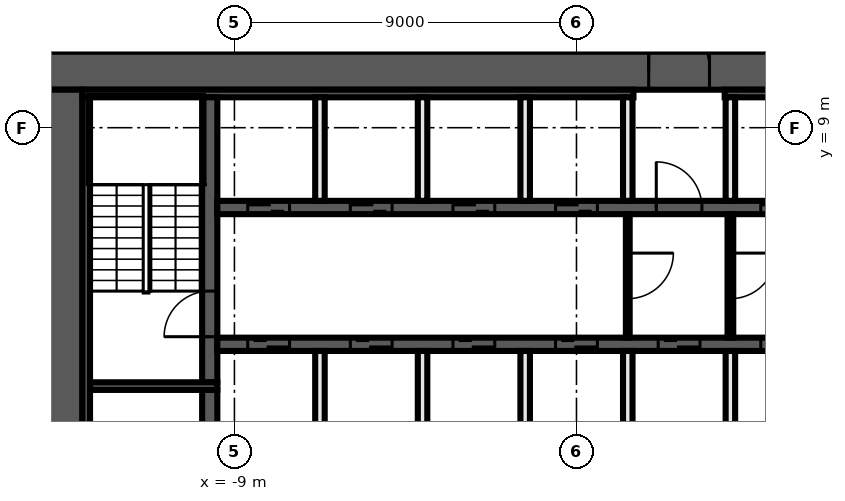
"""IFC4 building model, lengths in metres.
Left out: names, types, materials, properties, quantities, classifications, styles, units other than length and angle.
Written with IfcOpenShell. Run it as: python <this file> out.ifc"""

import sys

from ifc_helpers import new_model, si_unit, direction, frame, frame_2d, origin, place, context, subcontext, project, spatial, rectangle, extrude, element, fill, save


model = new_model("IFC4")
c1 = context("Model", 3, precision=1e-05, world=origin(), true_north=direction((0.0, 1.0)))
c2 = subcontext(c1, "Body", "Model", "MODEL_VIEW")
j1 = project(units=[si_unit("LENGTHUNIT", "METRE"), si_unit("PLANEANGLEUNIT", "RADIAN")], contexts=[c1])
p1 = place(None, origin())
s1 = spatial("IfcSite", under=j1, at=p1, CompositionType="ELEMENT")
p2 = place(p1, origin())
s2 = spatial("IfcBuilding", under=s1, at=p2, CompositionType="ELEMENT")
p3 = place(p2, frame((0.0, 0.0, 128.5)))
s3 = spatial("IfcBuildingStorey", under=s2, at=p3, CompositionType="ELEMENT", Elevation=128.5)
for number, where, z_axis, x_axis in (
    (1, (3.6, 11.0, 0.0), (0.0, 0.0, 1.0), (0.0, 1.0, 0.0)),
    (2, (1.8, 11.0, 0.0), (0.0, 0.0, 1.0), (0.0, 1.0, 0.0)),
):
    element("IfcWall", number, at=place(p3, frame(where, z_axis=z_axis, x_axis=x_axis)), inside=s3, PredefinedType="PARTITIONING", context=c2, shape_type="SweptSolid", body=[
        extrude(rectangle(XDim=0.925, YDim=0.15, at=frame_2d((0.462, 0.0))), origin(), (0.0, 0.0, 1.0), 3.3),
    ])
p4 = place(p3, frame((-14.0, 10.5, 0.0), z_axis=(0.0, 0.0, 1.0), x_axis=(1.0, 0.0, 0.0)))
e3 = element("IfcWall", 3, at=p4, inside=s3, PredefinedType="SHEAR", context=c2, shape_type="SweptSolid", body=[
    extrude(rectangle(XDim=28.0, YDim=1.0, at=frame_2d((14.0, 0.0))), origin(), (0.0, 0.0, 1.0), 3.3),
])
p5 = place(p4, frame((15.9, 0.0, 0.0)))
e4 = element("IfcOpeningElement", 4, at=p5, cuts=e3, PredefinedType="OPENING", context=c2, shape_type="SweptSolid", body=[
    extrude(rectangle(XDim=1.6, YDim=2.1, at=frame_2d((0.8, 1.05))), frame((0.0, 0.51, 0.0), z_axis=(0.0, -1.0, 0.0), x_axis=(1.0, 0.0, 0.0)), (0.0, 0.0, 1.0), 1.02),
])
p6 = place(p3, frame((-13.5, -10.0, 0.0), z_axis=(0.0, 0.0, 1.0), x_axis=(0.0, 1.0, 0.0)))
e5 = element("IfcWall", 5, at=p6, inside=s3, PredefinedType="SHEAR", context=c2, shape_type="SweptSolid", body=[
    extrude(rectangle(XDim=20.0, YDim=1.0, at=frame_2d((10.0, 0.0))), origin(), (0.0, 0.0, 1.0), 3.3),
])
p7 = place(p3, frame((-13.0, 9.9, 0.0), z_axis=(0.0, 0.0, 1.0), x_axis=(1.0, 0.0, 0.0)))
e6 = element("IfcWall", 6, at=p7, inside=s3, PredefinedType="SHEAR", context=c2, shape_type="SweptSolid", body=[
    extrude(rectangle(XDim=14.5, YDim=0.2, at=frame_2d((7.25, 0.0))), origin(), (0.0, 0.0, 1.0), 3.3),
])
p8 = place(p3, frame((3.9, 9.9, 0.0), z_axis=(0.0, 0.0, 1.0), x_axis=(1.0, 0.0, 0.0)))
e7 = element("IfcWall", 7, at=p8, inside=s3, PredefinedType="SHEAR", context=c2, shape_type="SweptSolid", body=[
    extrude(rectangle(XDim=9.1, YDim=0.2, at=frame_2d((4.55, 0.0))), origin(), (0.0, 0.0, 1.0), 3.3),
])
p9 = place(p3, frame((-12.9, -9.8, 0.0), z_axis=(0.0, 0.0, 1.0), x_axis=(0.0, 1.0, 0.0)))
e8 = element("IfcWall", 8, at=p9, inside=s3, PredefinedType="SHEAR", context=c2, shape_type="SweptSolid", body=[
    extrude(rectangle(XDim=19.6, YDim=0.2, at=frame_2d((9.8, 0.0))), origin(), (0.0, 0.0, 1.0), 3.3),
])
p10 = place(p3, frame((-9.65, -2.1, 0.0), z_axis=(0.0, 0.0, 1.0), x_axis=(0.0, 1.0, 0.0)))
e9 = element("IfcWall", 9, at=p10, inside=s3, PredefinedType="SHEAR", context=c2, shape_type="SweptSolid", body=[
    extrude(rectangle(XDim=4.2, YDim=0.4, at=frame_2d((2.1, 0.0))), origin(), (0.0, 0.0, 1.0), 3.3),
])
p11 = place(p3, frame((-9.65, 2.3, 0.0), z_axis=(0.0, 0.0, 1.0), x_axis=(0.0, 1.0, 0.0)))
e10 = element("IfcWall", 10, at=p11, inside=s3, PredefinedType="SHEAR", context=c2, shape_type="SweptSolid", body=[
    extrude(rectangle(XDim=7.5, YDim=0.4, at=frame_2d((3.75, 0.0))), origin(), (0.0, 0.0, 1.0), 3.3),
])
p12 = place(p11, frame((1.2, 0.0, 0.0)))
e11 = element("IfcOpeningElement", 11, at=p12, cuts=e10, PredefinedType="OPENING", context=c2, shape_type="SweptSolid", body=[
    extrude(rectangle(XDim=1.2, YDim=2.1, at=frame_2d((0.6, 1.05))), frame((0.0, 0.21, 0.0), z_axis=(0.0, -1.0, 0.0), x_axis=(1.0, 0.0, 0.0)), (0.0, 0.0, 1.0), 0.42),
])
p13 = place(p3, frame((-9.45, 2.2, 0.0), z_axis=(0.0, 0.0, 1.0), x_axis=(-1.0, 0.0, 0.0)))
e12 = element("IfcWall", 12, at=p13, inside=s3, PredefinedType="SHEAR", context=c2, shape_type="SweptSolid", body=[
    extrude(rectangle(XDim=3.35, YDim=0.2, at=frame_2d((1.675, 0.0))), origin(), (0.0, 0.0, 1.0), 3.3),
])
p14 = place(p3, frame((-9.45, 6.9, 0.0), z_axis=(0.0, 0.0, 1.0), x_axis=(1.0, 0.0, 0.0)))
e13 = element("IfcWall", 13, at=p14, inside=s3, PredefinedType="SHEAR", context=c2, shape_type="SweptSolid", body=[
    extrude(rectangle(XDim=18.9, YDim=0.35, at=frame_2d((9.45, 0.0))), origin(), (0.0, 0.0, 1.0), 3.3),
])
p15 = place(p14, frame((0.8, 0.0, 0.0)))
e14 = element("IfcOpeningElement", 14, at=p15, cuts=e13, PredefinedType="OPENING", context=c2, shape_type="SweptSolid", body=[
    extrude(rectangle(XDim=1.1, YDim=2.1, at=frame_2d((0.55, 1.05))), frame((0.0, 0.185, 0.0), z_axis=(0.0, -1.0, 0.0), x_axis=(1.0, 0.0, 0.0)), (0.0, 0.0, 1.0), 0.37),
])
p16 = place(p14, frame((3.5, 0.0, 0.0)))
e15 = element("IfcOpeningElement", 15, at=p16, cuts=e13, PredefinedType="OPENING", context=c2, shape_type="SweptSolid", body=[
    extrude(rectangle(XDim=1.1, YDim=2.1, at=frame_2d((0.55, 1.05))), frame((0.0, 0.185, 0.0), z_axis=(0.0, -1.0, 0.0), x_axis=(1.0, 0.0, 0.0)), (0.0, 0.0, 1.0), 0.37),
])
p17 = place(p14, frame((6.2, 0.0, 0.0)))
e16 = element("IfcOpeningElement", 16, at=p17, cuts=e13, PredefinedType="OPENING", context=c2, shape_type="SweptSolid", body=[
    extrude(rectangle(XDim=1.1, YDim=2.1, at=frame_2d((0.55, 1.05))), frame((0.0, 0.185, 0.0), z_axis=(0.0, -1.0, 0.0), x_axis=(1.0, 0.0, 0.0)), (0.0, 0.0, 1.0), 0.37),
])
p18 = place(p14, frame((8.9, 0.0, 0.0)))
e17 = element("IfcOpeningElement", 17, at=p18, cuts=e13, PredefinedType="OPENING", context=c2, shape_type="SweptSolid", body=[
    extrude(rectangle(XDim=1.1, YDim=2.1, at=frame_2d((0.55, 1.05))), frame((0.0, 0.185, 0.0), z_axis=(0.0, -1.0, 0.0), x_axis=(1.0, 0.0, 0.0)), (0.0, 0.0, 1.0), 0.37),
])
p19 = place(p14, frame((11.55, 0.0, 0.0)))
e18 = element("IfcOpeningElement", 18, at=p19, cuts=e13, PredefinedType="OPENING", context=c2, shape_type="SweptSolid", body=[
    extrude(rectangle(XDim=1.2, YDim=2.1, at=frame_2d((0.6, 1.05))), frame((0.0, 0.185, 0.0), z_axis=(0.0, -1.0, 0.0), x_axis=(1.0, 0.0, 0.0)), (0.0, 0.0, 1.0), 0.37),
])
p20 = place(p14, frame((14.3, 0.0, 0.0)))
e19 = element("IfcOpeningElement", 19, at=p20, cuts=e13, PredefinedType="OPENING", context=c2, shape_type="SweptSolid", body=[
    extrude(rectangle(XDim=1.1, YDim=2.1, at=frame_2d((0.55, 1.05))), frame((0.0, 0.185, 0.0), z_axis=(0.0, -1.0, 0.0), x_axis=(1.0, 0.0, 0.0)), (0.0, 0.0, 1.0), 0.37),
])
p21 = place(p14, frame((17.0, 0.0, 0.0)))
e20 = element("IfcOpeningElement", 20, at=p21, cuts=e13, PredefinedType="OPENING", context=c2, shape_type="SweptSolid", body=[
    extrude(rectangle(XDim=1.1, YDim=2.1, at=frame_2d((0.55, 1.05))), frame((0.0, 0.185, 0.0), z_axis=(0.0, -1.0, 0.0), x_axis=(1.0, 0.0, 0.0)), (0.0, 0.0, 1.0), 0.37),
])
p22 = place(p3, frame((9.45, 3.3, 0.0), z_axis=(0.0, 0.0, 1.0), x_axis=(-1.0, 0.0, 0.0)))
e21 = element("IfcWall", 21, at=p22, inside=s3, PredefinedType="SHEAR", context=c2, shape_type="SweptSolid", body=[
    extrude(rectangle(XDim=18.9, YDim=0.35, at=frame_2d((9.45, 0.0))), origin(), (0.0, 0.0, 1.0), 3.3),
])
p23 = place(p22, frame((17.0, 0.0, 0.0)))
e22 = element("IfcOpeningElement", 22, at=p23, cuts=e21, PredefinedType="OPENING", context=c2, shape_type="SweptSolid", body=[
    extrude(rectangle(XDim=1.1, YDim=2.1, at=frame_2d((0.55, 1.05))), frame((0.0, 0.185, 0.0), z_axis=(0.0, -1.0, 0.0), x_axis=(1.0, 0.0, 0.0)), (0.0, 0.0, 1.0), 0.37),
])
p24 = place(p22, frame((14.3, 0.0, 0.0)))
e23 = element("IfcOpeningElement", 23, at=p24, cuts=e21, PredefinedType="OPENING", context=c2, shape_type="SweptSolid", body=[
    extrude(rectangle(XDim=1.1, YDim=2.1, at=frame_2d((0.55, 1.05))), frame((0.0, 0.185, 0.0), z_axis=(0.0, -1.0, 0.0), x_axis=(1.0, 0.0, 0.0)), (0.0, 0.0, 1.0), 0.37),
])
p25 = place(p22, frame((11.6, 0.0, 0.0)))
e24 = element("IfcOpeningElement", 24, at=p25, cuts=e21, PredefinedType="OPENING", context=c2, shape_type="SweptSolid", body=[
    extrude(rectangle(XDim=1.1, YDim=2.1, at=frame_2d((0.55, 1.05))), frame((0.0, 0.185, 0.0), z_axis=(0.0, -1.0, 0.0), x_axis=(1.0, 0.0, 0.0)), (0.0, 0.0, 1.0), 0.37),
])
p26 = place(p22, frame((8.9, 0.0, 0.0)))
e25 = element("IfcOpeningElement", 25, at=p26, cuts=e21, PredefinedType="OPENING", context=c2, shape_type="SweptSolid", body=[
    extrude(rectangle(XDim=1.1, YDim=2.1, at=frame_2d((0.55, 1.05))), frame((0.0, 0.185, 0.0), z_axis=(0.0, -1.0, 0.0), x_axis=(1.0, 0.0, 0.0)), (0.0, 0.0, 1.0), 0.37),
])
p27 = place(p22, frame((6.2, 0.0, 0.0)))
e26 = element("IfcOpeningElement", 26, at=p27, cuts=e21, PredefinedType="OPENING", context=c2, shape_type="SweptSolid", body=[
    extrude(rectangle(XDim=1.1, YDim=2.1, at=frame_2d((0.55, 1.05))), frame((0.0, 0.185, 0.0), z_axis=(0.0, -1.0, 0.0), x_axis=(1.0, 0.0, 0.0)), (0.0, 0.0, 1.0), 0.37),
])
p28 = place(p22, frame((3.5, 0.0, 0.0)))
e27 = element("IfcOpeningElement", 27, at=p28, cuts=e21, PredefinedType="OPENING", context=c2, shape_type="SweptSolid", body=[
    extrude(rectangle(XDim=1.1, YDim=2.1, at=frame_2d((0.55, 1.05))), frame((0.0, 0.185, 0.0), z_axis=(0.0, -1.0, 0.0), x_axis=(1.0, 0.0, 0.0)), (0.0, 0.0, 1.0), 0.37),
])
p29 = place(p22, frame((0.9, 0.0, 0.0)))
e28 = element("IfcOpeningElement", 28, at=p29, cuts=e21, PredefinedType="OPENING", context=c2, shape_type="SweptSolid", body=[
    extrude(rectangle(XDim=0.9, YDim=2.1, at=frame_2d((0.45, 1.05))), frame((0.0, 0.185, 0.0), z_axis=(0.0, -1.0, 0.0), x_axis=(1.0, 0.0, 0.0)), (0.0, 0.0, 1.0), 0.37),
])
p30 = place(p3, frame((4.05, 6.725, 0.0), z_axis=(0.0, 0.0, 1.0), x_axis=(0.0, -1.0, 0.0)))
e29 = element("IfcWall", 29, at=p30, inside=s3, PredefinedType="PARTITIONING", context=c2, shape_type="SweptSolid", body=[
    extrude(rectangle(XDim=3.25, YDim=0.15, at=frame_2d((1.625, 0.0))), origin(), (0.0, 0.0, 1.0), 3.3),
])
p31 = place(p30, frame((1.025, 0.0, 0.0)))
e30 = element("IfcOpeningElement", 30, at=p31, cuts=e29, PredefinedType="OPENING", context=c2, shape_type="SweptSolid", body=[
    extrude(rectangle(XDim=1.2, YDim=2.1, at=frame_2d((0.6, 1.05))), frame((0.0, 0.085, 0.0), z_axis=(0.0, -1.0, 0.0), x_axis=(1.0, 0.0, 0.0)), (0.0, 0.0, 1.0), 0.17),
])
for number, where, z_axis, x_axis in (
    (31, (4.05, 0.4, 0.0), (0.0, 0.0, 1.0), (0.0, 1.0, 0.0)),
    (32, (4.05, 7.075, 0.0), (0.0, 0.0, 1.0), (0.0, 1.0, 0.0)),
):
    element("IfcWall", number, at=place(p3, frame(where, z_axis=z_axis, x_axis=x_axis)), inside=s3, PredefinedType="SOLIDWALL", context=c2, shape_type="SweptSolid", body=[
        extrude(rectangle(XDim=2.725, YDim=0.25, at=frame_2d((1.363, 0.0))), origin(), (0.0, 0.0, 1.0), 3.3),
    ])
p32 = place(p3, frame((1.35, 6.725, 0.0), z_axis=(0.0, 0.0, 1.0), x_axis=(0.0, -1.0, 0.0)))
e33 = element("IfcWall", 33, at=p32, inside=s3, PredefinedType="PARTITIONING", context=c2, shape_type="SweptSolid", body=[
    extrude(rectangle(XDim=3.25, YDim=0.1, at=frame_2d((1.625, 0.0))), origin(), (0.0, 0.0, 1.0), 3.3),
])
p33 = place(p32, frame((1.025, 0.0, 0.0)))
e34 = element("IfcOpeningElement", 34, at=p33, cuts=e33, PredefinedType="OPENING", context=c2, shape_type="SweptSolid", body=[
    extrude(rectangle(XDim=1.2, YDim=2.1, at=frame_2d((0.6, 1.05))), frame((0.0, 0.06, 0.0), z_axis=(0.0, -1.0, 0.0), x_axis=(1.0, 0.0, 0.0)), (0.0, 0.0, 1.0), 0.12),
])
for number, where, z_axis, x_axis in (
    (35, (1.35, 0.4, 0.0), (0.0, 0.0, 1.0), (0.0, 1.0, 0.0)),
    (36, (1.35, 7.075, 0.0), (0.0, 0.0, 1.0), (0.0, 1.0, 0.0)),
    (37, (-1.35, 0.4, 0.0), (0.0, 0.0, 1.0), (0.0, 1.0, 0.0)),
    (38, (-1.35, 7.075, 0.0), (0.0, 0.0, 1.0), (0.0, 1.0, 0.0)),
    (39, (-4.05, 0.4, 0.0), (0.0, 0.0, 1.0), (0.0, 1.0, 0.0)),
    (40, (-4.05, 7.075, 0.0), (0.0, 0.0, 1.0), (0.0, 1.0, 0.0)),
    (41, (-6.75, 0.4, 0.0), (0.0, 0.0, 1.0), (0.0, 1.0, 0.0)),
    (42, (-6.75, 7.075, 0.0), (0.0, 0.0, 1.0), (0.0, 1.0, 0.0)),
):
    element("IfcWall", number, at=place(p3, frame(where, z_axis=z_axis, x_axis=x_axis)), inside=s3, PredefinedType="SOLIDWALL", context=c2, shape_type="SweptSolid", body=[
        extrude(rectangle(XDim=2.725, YDim=0.25, at=frame_2d((1.363, 0.0))), origin(), (0.0, 0.0, 1.0), 3.3),
    ])
p34 = place(p15, origin())
e43 = element("IfcDoor", 43, at=p34, inside=s3, OperationType="DOUBLE_DOOR_SLIDING", PredefinedType="DOOR", context=c2, shape_type="SweptSolid", body=[
    extrude(rectangle(XDim=1.1, YDim=2.1, at=frame_2d((0.55, 1.05))), frame((0.0, 0.025, 0.0), z_axis=(0.0, -1.0, 0.0), x_axis=(1.0, 0.0, 0.0)), (0.0, 0.0, 1.0), 0.05),
])
fill(e14, e43)
p35 = place(p16, origin())
e44 = element("IfcDoor", 44, at=p35, inside=s3, OperationType="DOUBLE_DOOR_SLIDING", PredefinedType="DOOR", context=c2, shape_type="SweptSolid", body=[
    extrude(rectangle(XDim=1.1, YDim=2.1, at=frame_2d((0.55, 1.05))), frame((0.0, 0.025, 0.0), z_axis=(0.0, -1.0, 0.0), x_axis=(1.0, 0.0, 0.0)), (0.0, 0.0, 1.0), 0.05),
])
fill(e15, e44)
p36 = place(p17, origin())
e45 = element("IfcDoor", 45, at=p36, inside=s3, OperationType="DOUBLE_DOOR_SLIDING", PredefinedType="DOOR", context=c2, shape_type="SweptSolid", body=[
    extrude(rectangle(XDim=1.1, YDim=2.1, at=frame_2d((0.55, 1.05))), frame((0.0, 0.025, 0.0), z_axis=(0.0, -1.0, 0.0), x_axis=(1.0, 0.0, 0.0)), (0.0, 0.0, 1.0), 0.05),
])
fill(e16, e45)
p37 = place(p18, origin())
e46 = element("IfcDoor", 46, at=p37, inside=s3, OperationType="DOUBLE_DOOR_SLIDING", PredefinedType="DOOR", context=c2, shape_type="SweptSolid", body=[
    extrude(rectangle(XDim=1.1, YDim=2.1, at=frame_2d((0.55, 1.05))), frame((0.0, 0.025, 0.0), z_axis=(0.0, -1.0, 0.0), x_axis=(1.0, 0.0, 0.0)), (0.0, 0.0, 1.0), 0.05),
])
fill(e17, e46)
p38 = place(p5, origin())
e47 = element("IfcDoor", 47, at=p38, inside=s3, OperationType="DOUBLE_DOOR_SINGLE_SWING", PredefinedType="DOOR", context=c2, shape_type="SweptSolid", body=[
    extrude(rectangle(XDim=1.6, YDim=2.1, at=frame_2d((0.8, 1.05))), frame((0.0, 0.025, 0.0), z_axis=(0.0, -1.0, 0.0), x_axis=(1.0, 0.0, 0.0)), (0.0, 0.0, 1.0), 0.05),
])
fill(e4, e47)
p39 = place(p19, origin())
e48 = element("IfcDoor", 48, at=p39, inside=s3, OperationType="SINGLE_SWING_LEFT", PredefinedType="DOOR", context=c2, shape_type="SweptSolid", body=[
    extrude(rectangle(XDim=1.2, YDim=2.1, at=frame_2d((0.6, 1.05))), frame((0.0, 0.025, 0.0), z_axis=(0.0, -1.0, 0.0), x_axis=(1.0, 0.0, 0.0)), (0.0, 0.0, 1.0), 0.05),
])
fill(e18, e48)
p40 = place(p20, origin())
e49 = element("IfcDoor", 49, at=p40, inside=s3, OperationType="DOUBLE_DOOR_SLIDING", PredefinedType="DOOR", context=c2, shape_type="SweptSolid", body=[
    extrude(rectangle(XDim=1.1, YDim=2.1, at=frame_2d((0.55, 1.05))), frame((0.0, 0.025, 0.0), z_axis=(0.0, -1.0, 0.0), x_axis=(1.0, 0.0, 0.0)), (0.0, 0.0, 1.0), 0.05),
])
fill(e19, e49)
p41 = place(p23, origin())
e50 = element("IfcDoor", 50, at=p41, inside=s3, OperationType="DOUBLE_DOOR_SLIDING", PredefinedType="DOOR", context=c2, shape_type="SweptSolid", body=[
    extrude(rectangle(XDim=1.1, YDim=2.1, at=frame_2d((0.55, 1.05))), frame((0.0, 0.025, 0.0), z_axis=(0.0, -1.0, 0.0), x_axis=(1.0, 0.0, 0.0)), (0.0, 0.0, 1.0), 0.05),
])
fill(e22, e50)
p42 = place(p24, origin())
e51 = element("IfcDoor", 51, at=p42, inside=s3, OperationType="DOUBLE_DOOR_SLIDING", PredefinedType="DOOR", context=c2, shape_type="SweptSolid", body=[
    extrude(rectangle(XDim=1.1, YDim=2.1, at=frame_2d((0.55, 1.05))), frame((0.0, 0.025, 0.0), z_axis=(0.0, -1.0, 0.0), x_axis=(1.0, 0.0, 0.0)), (0.0, 0.0, 1.0), 0.05),
])
fill(e23, e51)
p43 = place(p25, origin())
e52 = element("IfcDoor", 52, at=p43, inside=s3, OperationType="DOUBLE_DOOR_SLIDING", PredefinedType="DOOR", context=c2, shape_type="SweptSolid", body=[
    extrude(rectangle(XDim=1.1, YDim=2.1, at=frame_2d((0.55, 1.05))), frame((0.0, 0.025, 0.0), z_axis=(0.0, -1.0, 0.0), x_axis=(1.0, 0.0, 0.0)), (0.0, 0.0, 1.0), 0.05),
])
fill(e24, e52)
p44 = place(p26, origin())
e53 = element("IfcDoor", 53, at=p44, inside=s3, OperationType="DOUBLE_DOOR_SLIDING", PredefinedType="DOOR", context=c2, shape_type="SweptSolid", body=[
    extrude(rectangle(XDim=1.1, YDim=2.1, at=frame_2d((0.55, 1.05))), frame((0.0, 0.025, 0.0), z_axis=(0.0, -1.0, 0.0), x_axis=(1.0, 0.0, 0.0)), (0.0, 0.0, 1.0), 0.05),
])
fill(e25, e53)
p45 = place(p27, origin())
e54 = element("IfcDoor", 54, at=p45, inside=s3, OperationType="DOUBLE_DOOR_SLIDING", PredefinedType="DOOR", context=c2, shape_type="SweptSolid", body=[
    extrude(rectangle(XDim=1.1, YDim=2.1, at=frame_2d((0.55, 1.05))), frame((0.0, 0.025, 0.0), z_axis=(0.0, -1.0, 0.0), x_axis=(1.0, 0.0, 0.0)), (0.0, 0.0, 1.0), 0.05),
])
fill(e26, e54)
p46 = place(p28, origin())
e55 = element("IfcDoor", 55, at=p46, inside=s3, OperationType="DOUBLE_DOOR_SLIDING", PredefinedType="DOOR", context=c2, shape_type="SweptSolid", body=[
    extrude(rectangle(XDim=1.1, YDim=2.1, at=frame_2d((0.55, 1.05))), frame((0.0, 0.025, 0.0), z_axis=(0.0, -1.0, 0.0), x_axis=(1.0, 0.0, 0.0)), (0.0, 0.0, 1.0), 0.05),
])
fill(e27, e55)
p47 = place(p12, origin())
e56 = element("IfcDoor", 56, at=p47, inside=s3, OperationType="SINGLE_SWING_RIGHT", PredefinedType="DOOR", context=c2, shape_type="SweptSolid", body=[
    extrude(rectangle(XDim=1.2, YDim=2.1, at=frame_2d((0.6, 1.05))), frame((0.0, 0.025, 0.0), z_axis=(0.0, -1.0, 0.0), x_axis=(1.0, 0.0, 0.0)), (0.0, 0.0, 1.0), 0.05),
])
fill(e11, e56)
p48 = place(p33, origin())
e57 = element("IfcDoor", 57, at=p48, inside=s3, OperationType="SINGLE_SWING_LEFT", PredefinedType="DOOR", context=c2, shape_type="SweptSolid", body=[
    extrude(rectangle(XDim=1.2, YDim=2.1, at=frame_2d((0.6, 1.05))), frame((0.0, 0.025, 0.0), z_axis=(0.0, -1.0, 0.0), x_axis=(1.0, 0.0, 0.0)), (0.0, 0.0, 1.0), 0.05),
])
fill(e34, e57)
p49 = place(p31, origin())
e58 = element("IfcDoor", 58, at=p49, inside=s3, OperationType="SINGLE_SWING_RIGHT", PredefinedType="DOOR", context=c2, shape_type="SweptSolid", body=[
    extrude(rectangle(XDim=1.2, YDim=2.1, at=frame_2d((0.6, 1.05))), frame((0.0, 0.025, 0.0), z_axis=(0.0, -1.0, 0.0), x_axis=(1.0, 0.0, 0.0)), (0.0, 0.0, 1.0), 0.05),
])
fill(e30, e58)
save(model, sys.argv[1])
